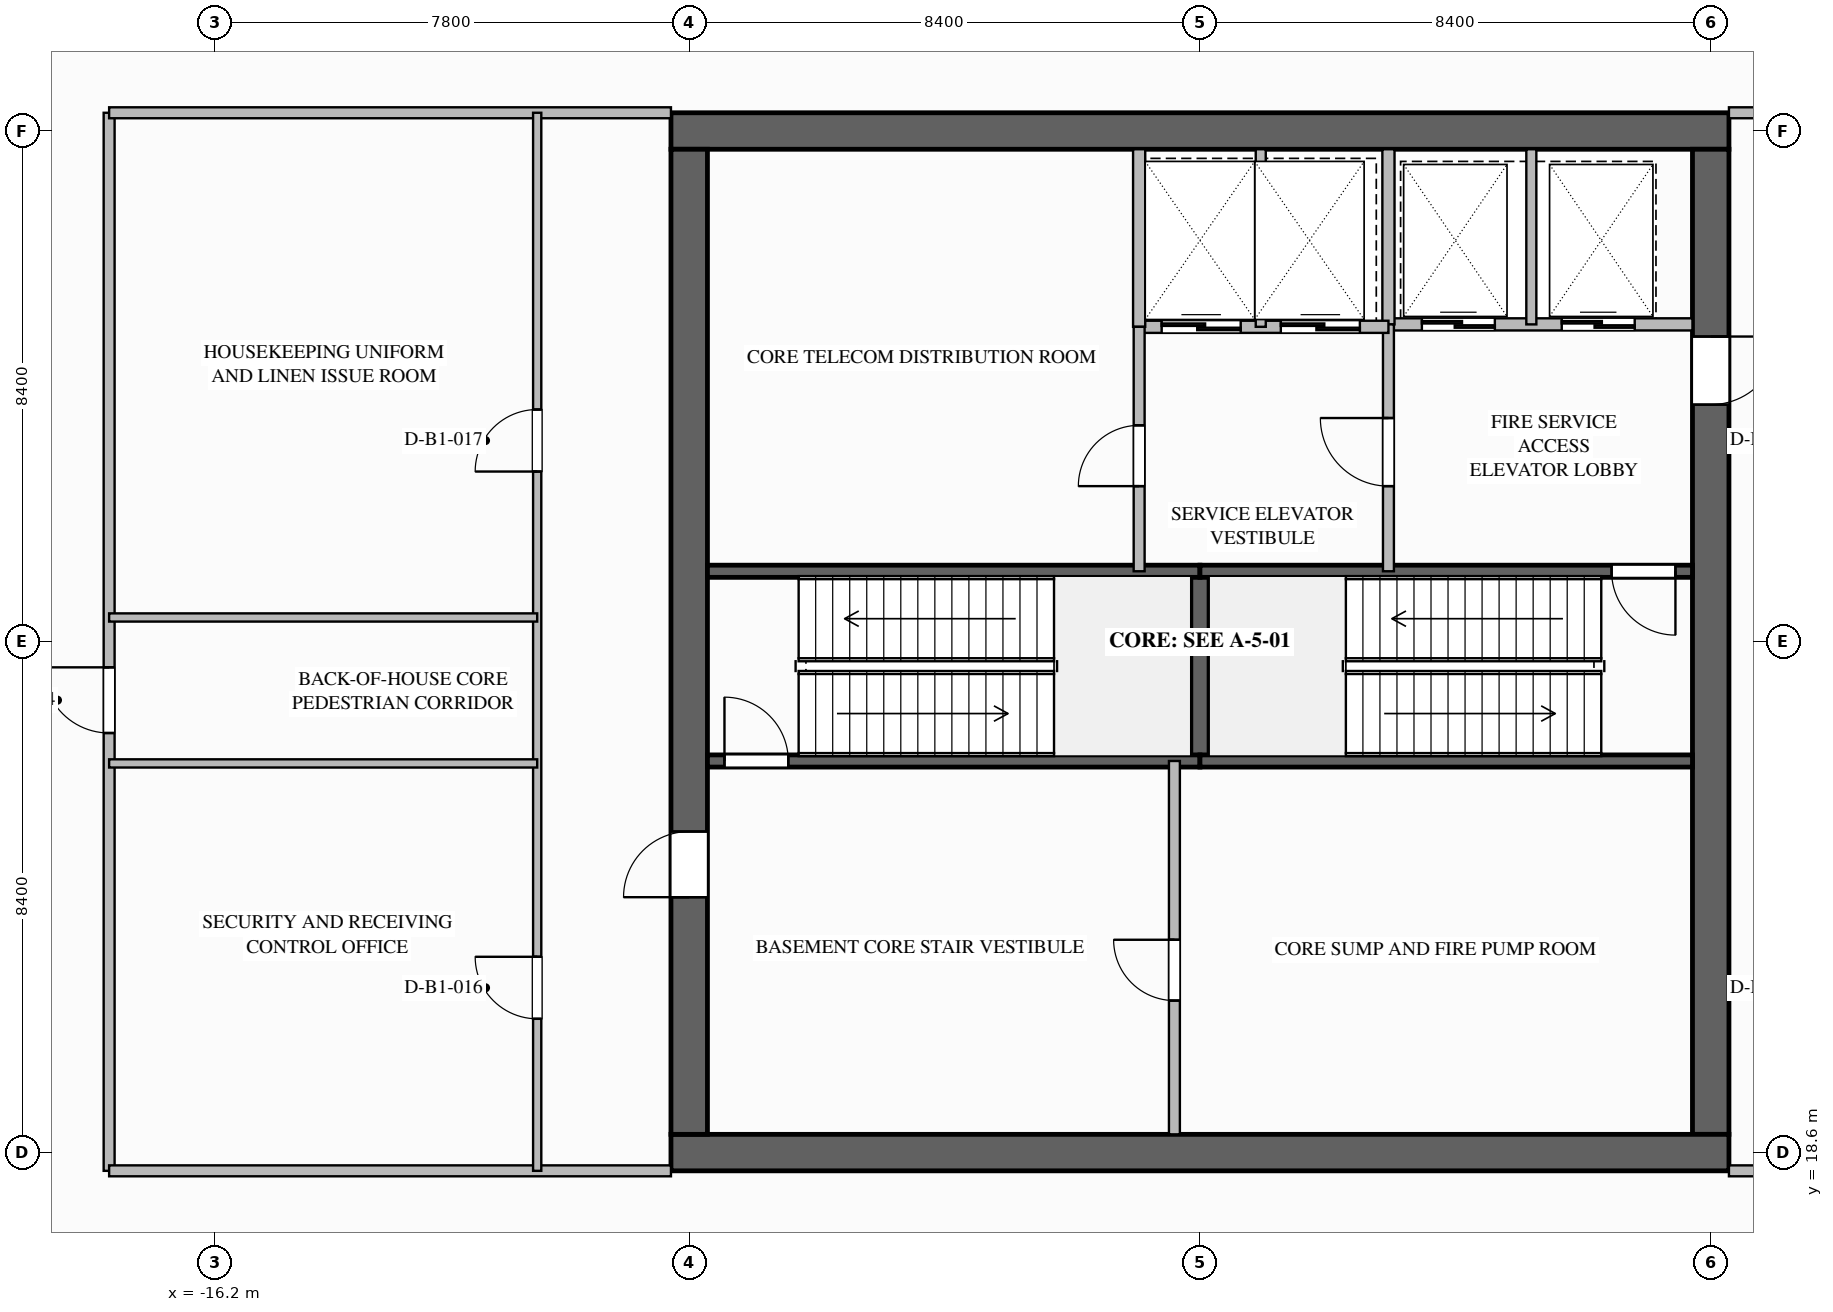
"""IFC4 building model, lengths in metres.
Left out: names, types, materials, properties, quantities, classifications, styles, units other than length and angle.
Written with IfcOpenShell. Run it as: python <this file> out.ifc"""

import sys

from ifc_helpers import new_model, si_unit, direction, frame, frame_2d, origin, place, context, subcontext, project, spatial, rectangle, extrude, element, fill, save


model = new_model("IFC4")
c1 = context("Model", 3, precision=1e-05, world=origin(), true_north=direction((0.0, 1.0)))
c2 = subcontext(c1, "Body", "Model", "MODEL_VIEW")
j1 = project(units=[si_unit("LENGTHUNIT", "METRE"), si_unit("PLANEANGLEUNIT", "RADIAN")], contexts=[c1])
p1 = place(None, origin())
s1 = spatial("IfcSite", under=j1, at=p1, CompositionType="ELEMENT")
p2 = place(p1, origin())
s2 = spatial("IfcBuilding", under=s1, at=p2, CompositionType="ELEMENT")
p3 = place(p2, frame((0.0, 0.0, -5.4)))
s3 = spatial("IfcBuildingStorey", under=s2, at=p3, CompositionType="ELEMENT", Elevation=-5.4)
p4 = place(p3, frame((-8.7, 35.4, 0.0), z_axis=(0.0, 0.0, 1.0), x_axis=(1.0, 0.0, 0.0)))
e1 = element("IfcWall", 1, at=p4, inside=s3, PredefinedType="SHEAR", context=c2, shape_type="SweptSolid", body=[
    extrude(rectangle(XDim=17.4, YDim=0.6, at=frame_2d((8.7, 0.0))), origin(), (0.0, 0.0, 1.0), 5.4),
])
p5 = place(p3, frame((8.4, 35.1, 0.0), z_axis=(0.0, 0.0, 1.0), x_axis=(0.0, -1.0, 0.0)))
e2 = element("IfcWall", 2, at=p5, inside=s3, PredefinedType="SHEAR", context=c2, shape_type="SweptSolid", body=[
    extrude(rectangle(XDim=16.2, YDim=0.6, at=frame_2d((8.1, 0.0))), origin(), (0.0, 0.0, 1.0), 5.4),
])
p6 = place(p5, frame((3.08, 0.0, 0.0)))
e3 = element("IfcOpeningElement", 3, at=p6, cuts=e2, PredefinedType="OPENING", context=c2, shape_type="SweptSolid", body=[
    extrude(rectangle(XDim=1.12, YDim=2.1, at=frame_2d((0.56, 1.05))), frame((0.0, 0.31, 0.0), z_axis=(0.0, -1.0, 0.0), x_axis=(1.0, 0.0, 0.0)), (0.0, 0.0, 1.0), 0.62),
])
p7 = place(p3, frame((8.7, 18.6, 0.0), z_axis=(0.0, 0.0, 1.0), x_axis=(-1.0, 0.0, 0.0)))
e4 = element("IfcWall", 4, at=p7, inside=s3, PredefinedType="SHEAR", context=c2, shape_type="SweptSolid", body=[
    extrude(rectangle(XDim=17.4, YDim=0.6, at=frame_2d((8.7, 0.0))), origin(), (0.0, 0.0, 1.0), 5.4),
])
p8 = place(p3, frame((-8.4, 18.9, 0.0), z_axis=(0.0, 0.0, 1.0), x_axis=(0.0, 1.0, 0.0)))
e5 = element("IfcWall", 5, at=p8, inside=s3, PredefinedType="SHEAR", context=c2, shape_type="SweptSolid", body=[
    extrude(rectangle(XDim=16.2, YDim=0.6, at=frame_2d((8.1, 0.0))), origin(), (0.0, 0.0, 1.0), 5.4),
])
p9 = place(p8, frame((3.9, 0.0, 0.0)))
e6 = element("IfcOpeningElement", 6, at=p9, cuts=e5, PredefinedType="OPENING", context=c2, shape_type="SweptSolid", body=[
    extrude(rectangle(XDim=1.08, YDim=2.04, at=frame_2d((0.54, 1.02))), frame((0.0, 0.31, 0.0), z_axis=(0.0, -1.0, 0.0), x_axis=(1.0, 0.0, 0.0)), (0.0, 0.0, 1.0), 0.62),
])
p10 = place(p3, frame((0.0, 25.04, 0.0), z_axis=(0.0, 0.0, 1.0), x_axis=(0.0, 1.0, 0.0)))
e7 = element("IfcWall", 7, at=p10, inside=s3, PredefinedType="SOLIDWALL", context=c2, shape_type="SweptSolid", body=[
    extrude(rectangle(XDim=3.12, YDim=0.3, at=frame_2d((1.56, 0.0))), origin(), (0.0, 0.0, 1.0), 5.05),
])
p11 = place(p3, frame((-8.1, 25.04, 0.0), z_axis=(0.0, 0.0, 1.0), x_axis=(1.0, 0.0, 0.0)))
e8 = element("IfcWall", 8, at=p11, inside=s3, PredefinedType="SOLIDWALL", context=c2, shape_type="SweptSolid", body=[
    extrude(rectangle(XDim=8.1, YDim=0.2, at=frame_2d((4.05, 0.0))), origin(), (0.0, 0.0, 1.0), 5.05),
])
p12 = place(p11, frame((0.28, 0.0, 0.0)))
e9 = element("IfcOpeningElement", 9, at=p12, cuts=e8, PredefinedType="OPENING", context=c2, shape_type="SweptSolid", body=[
    extrude(rectangle(XDim=1.05, YDim=2.1, at=frame_2d((0.525, 1.05))), frame((0.0, 0.11, 0.0), z_axis=(0.0, -1.0, 0.0), x_axis=(1.0, 0.0, 0.0)), (0.0, 0.0, 1.0), 0.22),
])
for number, where, z_axis, x_axis in (
    (10, (-8.1, 28.16, 0.0), (0.0, 0.0, 1.0), (1.0, 0.0, 0.0)),
    (11, (0.0, 25.04, 0.0), (0.0, 0.0, 1.0), (1.0, 0.0, 0.0)),
):
    element("IfcWall", number, at=place(p3, frame(where, z_axis=z_axis, x_axis=x_axis)), inside=s3, PredefinedType="SOLIDWALL", context=c2, shape_type="SweptSolid", body=[
        extrude(rectangle(XDim=8.1, YDim=0.2, at=frame_2d((4.05, 0.0))), origin(), (0.0, 0.0, 1.0), 5.05),
    ])
p13 = place(p3, frame((8.1, 28.16, 0.0), z_axis=(0.0, 0.0, 1.0), x_axis=(-1.0, 0.0, 0.0)))
e12 = element("IfcWall", 12, at=p13, inside=s3, PredefinedType="SOLIDWALL", context=c2, shape_type="SweptSolid", body=[
    extrude(rectangle(XDim=8.1, YDim=0.2, at=frame_2d((4.05, 0.0))), origin(), (0.0, 0.0, 1.0), 5.05),
])
p14 = place(p13, frame((0.28, 0.0, 0.0)))
e13 = element("IfcOpeningElement", 13, at=p14, cuts=e12, PredefinedType="OPENING", context=c2, shape_type="SweptSolid", body=[
    extrude(rectangle(XDim=1.05, YDim=2.1, at=frame_2d((0.525, 1.05))), frame((0.0, 0.11, 0.0), z_axis=(0.0, -1.0, 0.0), x_axis=(1.0, 0.0, 0.0)), (0.0, 0.0, 1.0), 0.22),
])
p15 = place(p3, frame((3.1, 32.22, 0.0), z_axis=(0.0, 0.0, 1.0), x_axis=(1.0, 0.0, 0.0)))
e14 = element("IfcWall", 14, at=p15, inside=s3, PredefinedType="SOLIDWALL", context=c2, shape_type="SweptSolid", body=[
    extrude(rectangle(XDim=5.0, YDim=0.2, at=frame_2d((2.5, 0.0))), origin(), (0.0, 0.0, 1.0), 5.05),
])
p16 = place(p15, frame((0.55, 0.0, 0.0)))
e15 = element("IfcOpeningElement", 15, at=p16, cuts=e14, PredefinedType="OPENING", context=c2, shape_type="SweptSolid", body=[
    extrude(rectangle(XDim=1.2, YDim=2.2, at=frame_2d((0.6, 1.1))), frame((0.0, 0.11, 0.0), z_axis=(0.0, -1.0, 0.0), x_axis=(1.0, 0.0, 0.0)), (0.0, 0.0, 1.0), 0.22),
])
p17 = place(p15, frame((2.85, 0.0, 0.0)))
e16 = element("IfcOpeningElement", 16, at=p17, cuts=e14, PredefinedType="OPENING", context=c2, shape_type="SweptSolid", body=[
    extrude(rectangle(XDim=1.2, YDim=2.2, at=frame_2d((0.6, 1.1))), frame((0.0, 0.11, 0.0), z_axis=(0.0, -1.0, 0.0), x_axis=(1.0, 0.0, 0.0)), (0.0, 0.0, 1.0), 0.22),
])
p18 = place(p3, frame((3.1, 32.22, 0.0), z_axis=(0.0, 0.0, 1.0), x_axis=(0.0, 1.0, 0.0)))
e17 = element("IfcWall", 17, at=p18, inside=s3, PredefinedType="SOLIDWALL", context=c2, shape_type="SweptSolid", body=[
    extrude(rectangle(XDim=2.88, YDim=0.2, at=frame_2d((1.44, 0.0))), origin(), (0.0, 0.0, 1.0), 5.05),
])
p19 = place(p3, frame((5.45, 32.22, 0.0), z_axis=(0.0, 0.0, 1.0), x_axis=(0.0, 1.0, 0.0)))
e18 = element("IfcWall", 18, at=p19, inside=s3, PredefinedType="PARTITIONING", context=c2, shape_type="SweptSolid", body=[
    extrude(rectangle(XDim=2.88, YDim=0.165, at=frame_2d((1.44, 0.0))), origin(), (0.0, 0.0, 1.0), 5.05),
])
p20 = place(p3, frame((3.1, 28.16, 0.0), z_axis=(0.0, 0.0, 1.0), x_axis=(0.0, 1.0, 0.0)))
e19 = element("IfcWall", 19, at=p20, inside=s3, PredefinedType="SOLIDWALL", context=c2, shape_type="SweptSolid", body=[
    extrude(rectangle(XDim=4.06, YDim=0.18, at=frame_2d((2.03, 0.0))), origin(), (0.0, 0.0, 1.0), 5.05),
])
p21 = place(p20, frame((1.4, 0.0, 0.0)))
e20 = element("IfcOpeningElement", 20, at=p21, cuts=e19, PredefinedType="OPENING", context=c2, shape_type="SweptSolid", body=[
    extrude(rectangle(XDim=1.12, YDim=2.1, at=frame_2d((0.56, 1.05))), frame((0.0, 0.1, 0.0), z_axis=(0.0, -1.0, 0.0), x_axis=(1.0, 0.0, 0.0)), (0.0, 0.0, 1.0), 0.2),
])
p22 = place(p3, frame((-1.0, 32.18, 0.0), z_axis=(0.0, 0.0, 1.0), x_axis=(1.0, 0.0, 0.0)))
e21 = element("IfcWall", 21, at=p22, inside=s3, PredefinedType="SOLIDWALL", context=c2, shape_type="SweptSolid", body=[
    extrude(rectangle(XDim=4.1, YDim=0.2, at=frame_2d((2.05, 0.0))), origin(), (0.0, 0.0, 1.0), 5.05),
])
p23 = place(p22, frame((0.37, 0.0, 0.0)))
e22 = element("IfcOpeningElement", 22, at=p23, cuts=e21, PredefinedType="OPENING", context=c2, shape_type="SweptSolid", body=[
    extrude(rectangle(XDim=1.3, YDim=2.2, at=frame_2d((0.65, 1.1))), frame((0.0, 0.11, 0.0), z_axis=(0.0, -1.0, 0.0), x_axis=(1.0, 0.0, 0.0)), (0.0, 0.0, 1.0), 0.22),
])
p24 = place(p22, frame((2.33, 0.0, 0.0)))
e23 = element("IfcOpeningElement", 23, at=p24, cuts=e21, PredefinedType="OPENING", context=c2, shape_type="SweptSolid", body=[
    extrude(rectangle(XDim=1.3, YDim=2.2, at=frame_2d((0.65, 1.1))), frame((0.0, 0.11, 0.0), z_axis=(0.0, -1.0, 0.0), x_axis=(1.0, 0.0, 0.0)), (0.0, 0.0, 1.0), 0.22),
])
p25 = place(p3, frame((-1.0, 32.18, 0.0), z_axis=(0.0, 0.0, 1.0), x_axis=(0.0, 1.0, 0.0)))
e24 = element("IfcWall", 24, at=p25, inside=s3, PredefinedType="SOLIDWALL", context=c2, shape_type="SweptSolid", body=[
    extrude(rectangle(XDim=2.92, YDim=0.2, at=frame_2d((1.46, 0.0))), origin(), (0.0, 0.0, 1.0), 5.05),
])
p26 = place(p3, frame((1.0, 32.18, 0.0), z_axis=(0.0, 0.0, 1.0), x_axis=(0.0, 1.0, 0.0)))
e25 = element("IfcWall", 25, at=p26, inside=s3, PredefinedType="PARTITIONING", context=c2, shape_type="SweptSolid", body=[
    extrude(rectangle(XDim=2.92, YDim=0.165, at=frame_2d((1.46, 0.0))), origin(), (0.0, 0.0, 1.0), 5.05),
])
p27 = place(p3, frame((-1.0, 28.16, 0.0), z_axis=(0.0, 0.0, 1.0), x_axis=(0.0, 1.0, 0.0)))
e26 = element("IfcWall", 26, at=p27, inside=s3, PredefinedType="SOLIDWALL", context=c2, shape_type="SweptSolid", body=[
    extrude(rectangle(XDim=4.02, YDim=0.18, at=frame_2d((2.01, 0.0))), origin(), (0.0, 0.0, 1.0), 5.05),
])
p28 = place(p27, frame((1.4, 0.0, 0.0)))
e27 = element("IfcOpeningElement", 27, at=p28, cuts=e26, PredefinedType="OPENING", context=c2, shape_type="SweptSolid", body=[
    extrude(rectangle(XDim=1.0, YDim=2.1, at=frame_2d((0.5, 1.05))), frame((0.0, 0.1, 0.0), z_axis=(0.0, -1.0, 0.0), x_axis=(1.0, 0.0, 0.0)), (0.0, 0.0, 1.0), 0.2),
])
p29 = place(p3, frame((-0.42, 18.9, 0.0), z_axis=(0.0, 0.0, 1.0), x_axis=(0.0, 1.0, 0.0)))
e28 = element("IfcWall", 28, at=p29, inside=s3, PredefinedType="SOLIDWALL", context=c2, shape_type="SweptSolid", body=[
    extrude(rectangle(XDim=6.14, YDim=0.18, at=frame_2d((3.07, 0.0))), origin(), (0.0, 0.0, 1.0), 5.05),
])
p30 = place(p29, frame((2.2, 0.0, 0.0)))
e29 = element("IfcOpeningElement", 29, at=p30, cuts=e28, PredefinedType="OPENING", context=c2, shape_type="SweptSolid", body=[
    extrude(rectangle(XDim=1.0, YDim=2.1, at=frame_2d((0.5, 1.05))), frame((0.0, 0.1, 0.0), z_axis=(0.0, -1.0, 0.0), x_axis=(1.0, 0.0, 0.0)), (0.0, 0.0, 1.0), 0.2),
])
p31 = place(p3, frame((-17.94, 18.3, 0.0), z_axis=(0.0, 0.0, 1.0), x_axis=(0.0, 1.0, 0.0)))
e30 = element("IfcWall", 30, at=p31, inside=s3, PredefinedType="SOLIDWALL", context=c2, shape_type="SweptSolid", body=[
    extrude(rectangle(XDim=17.4, YDim=0.18, at=frame_2d((8.7, 0.0))), origin(), (0.0, 0.0, 1.0), 5.05),
])
p32 = place(p31, frame((7.2, 0.0, 0.0)))
e31 = element("IfcOpeningElement", 31, at=p32, cuts=e30, PredefinedType="OPENING", context=c2, shape_type="SweptSolid", body=[
    extrude(rectangle(XDim=1.08, YDim=2.04, at=frame_2d((0.54, 1.02))), frame((0.0, 0.1, 0.0), z_axis=(0.0, -1.0, 0.0), x_axis=(1.0, 0.0, 0.0)), (0.0, 0.0, 1.0), 0.2),
])
for number, where, z_axis, x_axis in (
    (32, (-17.94, 18.3, 0.0), (0.0, 0.0, 1.0), (1.0, 0.0, 0.0)),
    (33, (8.7, 18.3, 0.0), (0.0, 0.0, 1.0), (1.0, 0.0, 0.0)),
    (34, (-17.94, 35.7, 0.0), (0.0, 0.0, 1.0), (1.0, 0.0, 0.0)),
    (35, (8.7, 35.7, 0.0), (0.0, 0.0, 1.0), (1.0, 0.0, 0.0)),
):
    element("IfcWall", number, at=place(p3, frame(where, z_axis=z_axis, x_axis=x_axis)), inside=s3, PredefinedType="SOLIDWALL", context=c2, shape_type="SweptSolid", body=[
        extrude(rectangle(XDim=9.24, YDim=0.18, at=frame_2d((4.62, 0.0))), origin(), (0.0, 0.0, 1.0), 4.262),
    ])
p33 = place(p3, frame((-10.9, 18.3, 0.0), z_axis=(0.0, 0.0, 1.0), x_axis=(0.0, 1.0, 0.0)))
e36 = element("IfcWall", 36, at=p33, inside=s3, PredefinedType="PARTITIONING", context=c2, shape_type="SweptSolid", body=[
    extrude(rectangle(XDim=17.4, YDim=0.135, at=frame_2d((8.7, 0.0))), origin(), (0.0, 0.0, 1.0), 5.05),
])
p34 = place(p33, frame((2.5, 0.0, 0.0)))
e37 = element("IfcOpeningElement", 37, at=p34, cuts=e36, PredefinedType="OPENING", context=c2, shape_type="SweptSolid", body=[
    extrude(rectangle(XDim=1.02, YDim=2.15, at=frame_2d((0.51, 1.075))), frame((0.0, 0.077, 0.0), z_axis=(0.0, -1.0, 0.0), x_axis=(1.0, 0.0, 0.0)), (0.0, 0.0, 1.0), 0.155),
])
p35 = place(p33, frame((11.5, 0.0, 0.0)))
e38 = element("IfcOpeningElement", 38, at=p35, cuts=e36, PredefinedType="OPENING", context=c2, shape_type="SweptSolid", body=[
    extrude(rectangle(XDim=1.02, YDim=2.15, at=frame_2d((0.51, 1.075))), frame((0.0, 0.077, 0.0), z_axis=(0.0, -1.0, 0.0), x_axis=(1.0, 0.0, 0.0)), (0.0, 0.0, 1.0), 0.155),
])
for number, where, z_axis, x_axis in (
    (39, (-17.94, 25.0, 0.0), (0.0, 0.0, 1.0), (1.0, 0.0, 0.0)),
    (40, (-17.94, 27.4, 0.0), (0.0, 0.0, 1.0), (1.0, 0.0, 0.0)),
):
    element("IfcWall", number, at=place(p3, frame(where, z_axis=z_axis, x_axis=x_axis)), inside=s3, PredefinedType="PARTITIONING", context=c2, shape_type="SweptSolid", body=[
        extrude(rectangle(XDim=7.04, YDim=0.135, at=frame_2d((3.52, 0.0))), origin(), (0.0, 0.0, 1.0), 5.05),
    ])
p36 = place(p12, origin())
e41 = element("IfcDoor", 41, at=p36, inside=s3, OperationType="SINGLE_SWING_LEFT", PredefinedType="DOOR", context=c2, shape_type="SweptSolid", body=[
    extrude(rectangle(XDim=1.05, YDim=2.1, at=frame_2d((0.525, 1.05))), frame((0.0, 0.025, 0.0), z_axis=(0.0, -1.0, 0.0), x_axis=(1.0, 0.0, 0.0)), (0.0, 0.0, 1.0), 0.05),
])
fill(e9, e41)
p37 = place(p14, origin())
e42 = element("IfcDoor", 42, at=p37, inside=s3, OperationType="SINGLE_SWING_LEFT", PredefinedType="DOOR", context=c2, shape_type="SweptSolid", body=[
    extrude(rectangle(XDim=1.05, YDim=2.1, at=frame_2d((0.525, 1.05))), frame((0.0, 0.025, 0.0), z_axis=(0.0, -1.0, 0.0), x_axis=(1.0, 0.0, 0.0)), (0.0, 0.0, 1.0), 0.05),
])
fill(e13, e42)
p38 = place(p16, origin())
e43 = element("IfcDoor", 43, at=p38, inside=s3, OperationType="SLIDING_TO_LEFT", PredefinedType="DOOR", context=c2, shape_type="SweptSolid", body=[
    extrude(rectangle(XDim=1.2, YDim=2.2, at=frame_2d((0.6, 1.1))), frame((0.0, 0.025, 0.0), z_axis=(0.0, -1.0, 0.0), x_axis=(1.0, 0.0, 0.0)), (0.0, 0.0, 1.0), 0.05),
])
fill(e15, e43)
p39 = place(p17, origin())
e44 = element("IfcDoor", 44, at=p39, inside=s3, OperationType="SLIDING_TO_LEFT", PredefinedType="DOOR", context=c2, shape_type="SweptSolid", body=[
    extrude(rectangle(XDim=1.2, YDim=2.2, at=frame_2d((0.6, 1.1))), frame((0.0, 0.025, 0.0), z_axis=(0.0, -1.0, 0.0), x_axis=(1.0, 0.0, 0.0)), (0.0, 0.0, 1.0), 0.05),
])
fill(e16, e44)
p40 = place(p21, origin())
e45 = element("IfcDoor", 45, at=p40, inside=s3, OperationType="SINGLE_SWING_RIGHT", PredefinedType="DOOR", context=c2, shape_type="SweptSolid", body=[
    extrude(rectangle(XDim=1.12, YDim=2.1, at=frame_2d((0.56, 1.05))), frame((0.0, 0.025, 0.0), z_axis=(0.0, -1.0, 0.0), x_axis=(1.0, 0.0, 0.0)), (0.0, 0.0, 1.0), 0.05),
])
fill(e20, e45)
p41 = place(p6, origin())
e46 = element("IfcDoor", 46, at=p41, inside=s3, OperationType="SINGLE_SWING_LEFT", PredefinedType="DOOR", context=c2, shape_type="SweptSolid", body=[
    extrude(rectangle(XDim=1.12, YDim=2.1, at=frame_2d((0.56, 1.05))), frame((0.0, 0.025, 0.0), z_axis=(0.0, -1.0, 0.0), x_axis=(1.0, 0.0, 0.0)), (0.0, 0.0, 1.0), 0.05),
])
fill(e3, e46)
p42 = place(p23, origin())
e47 = element("IfcDoor", 47, at=p42, inside=s3, OperationType="SLIDING_TO_LEFT", PredefinedType="DOOR", context=c2, shape_type="SweptSolid", body=[
    extrude(rectangle(XDim=1.3, YDim=2.2, at=frame_2d((0.65, 1.1))), frame((0.0, 0.025, 0.0), z_axis=(0.0, -1.0, 0.0), x_axis=(1.0, 0.0, 0.0)), (0.0, 0.0, 1.0), 0.05),
])
fill(e22, e47)
p43 = place(p24, origin())
e48 = element("IfcDoor", 48, at=p43, inside=s3, OperationType="SLIDING_TO_LEFT", PredefinedType="DOOR", context=c2, shape_type="SweptSolid", body=[
    extrude(rectangle(XDim=1.3, YDim=2.2, at=frame_2d((0.65, 1.1))), frame((0.0, 0.025, 0.0), z_axis=(0.0, -1.0, 0.0), x_axis=(1.0, 0.0, 0.0)), (0.0, 0.0, 1.0), 0.05),
])
fill(e23, e48)
p44 = place(p28, origin())
e49 = element("IfcDoor", 49, at=p44, inside=s3, OperationType="SINGLE_SWING_LEFT", PredefinedType="DOOR", context=c2, shape_type="SweptSolid", body=[
    extrude(rectangle(XDim=1.0, YDim=2.1, at=frame_2d((0.5, 1.05))), frame((0.0, 0.025, 0.0), z_axis=(0.0, -1.0, 0.0), x_axis=(1.0, 0.0, 0.0)), (0.0, 0.0, 1.0), 0.05),
])
fill(e27, e49)
p45 = place(p30, origin())
e50 = element("IfcDoor", 50, at=p45, inside=s3, OperationType="SINGLE_SWING_RIGHT", PredefinedType="DOOR", context=c2, shape_type="SweptSolid", body=[
    extrude(rectangle(XDim=1.0, YDim=2.1, at=frame_2d((0.5, 1.05))), frame((0.0, 0.025, 0.0), z_axis=(0.0, -1.0, 0.0), x_axis=(1.0, 0.0, 0.0)), (0.0, 0.0, 1.0), 0.05),
])
fill(e29, e50)
p46 = place(p9, origin())
e51 = element("IfcDoor", 51, at=p46, inside=s3, OperationType="SINGLE_SWING_LEFT", PredefinedType="DOOR", context=c2, shape_type="SweptSolid", body=[
    extrude(rectangle(XDim=1.08, YDim=2.04, at=frame_2d((0.54, 1.02))), frame((0.0, 0.025, 0.0), z_axis=(0.0, -1.0, 0.0), x_axis=(1.0, 0.0, 0.0)), (0.0, 0.0, 1.0), 0.05),
])
fill(e6, e51)
p47 = place(p32, origin())
e52 = element("IfcDoor", 52, at=p47, inside=s3, OperationType="SINGLE_SWING_RIGHT", PredefinedType="DOOR", context=c2, shape_type="SweptSolid", body=[
    extrude(rectangle(XDim=1.08, YDim=2.04, at=frame_2d((0.54, 1.02))), frame((0.0, 0.025, 0.0), z_axis=(0.0, -1.0, 0.0), x_axis=(1.0, 0.0, 0.0)), (0.0, 0.0, 1.0), 0.05),
])
fill(e31, e52)
p48 = place(p34, origin())
e53 = element("IfcDoor", 53, at=p48, inside=s3, OperationType="SINGLE_SWING_RIGHT", PredefinedType="DOOR", context=c2, shape_type="SweptSolid", body=[
    extrude(rectangle(XDim=1.02, YDim=2.15, at=frame_2d((0.51, 1.075))), frame((0.0, 0.025, 0.0), z_axis=(0.0, -1.0, 0.0), x_axis=(1.0, 0.0, 0.0)), (0.0, 0.0, 1.0), 0.05),
])
fill(e37, e53)
p49 = place(p35, origin())
e54 = element("IfcDoor", 54, at=p49, inside=s3, OperationType="SINGLE_SWING_LEFT", PredefinedType="DOOR", context=c2, shape_type="SweptSolid", body=[
    extrude(rectangle(XDim=1.02, YDim=2.15, at=frame_2d((0.51, 1.075))), frame((0.0, 0.025, 0.0), z_axis=(0.0, -1.0, 0.0), x_axis=(1.0, 0.0, 0.0)), (0.0, 0.0, 1.0), 0.05),
])
fill(e38, e54)
save(model, sys.argv[1])
